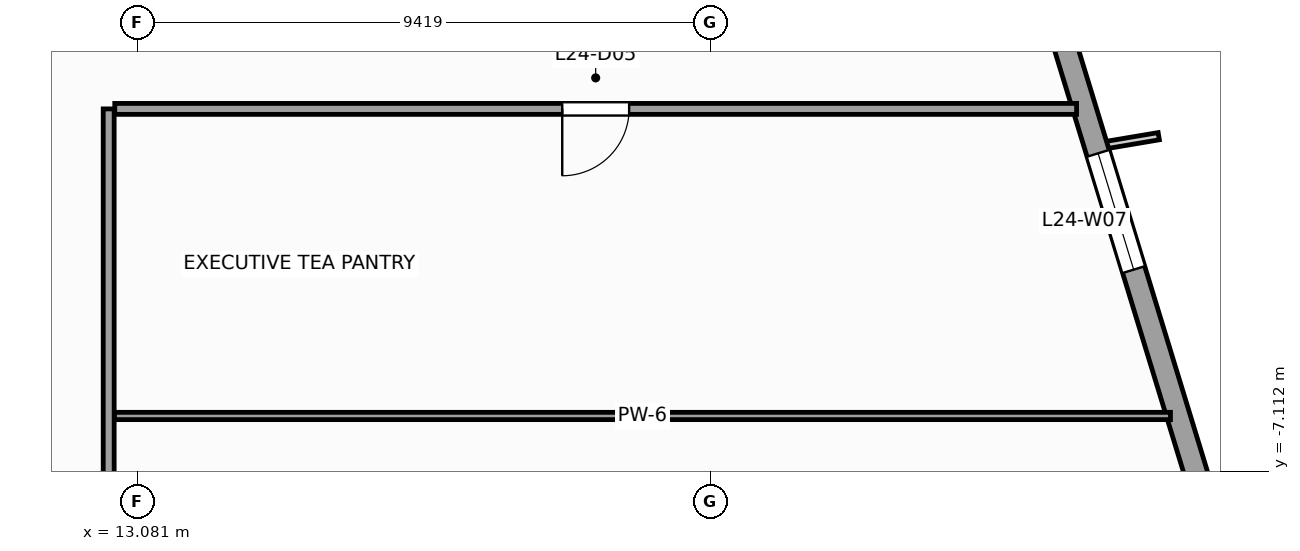
"""IFC4 building model, lengths in metres.
Left out: names, types, materials, properties, quantities, classifications, styles, units other than length and angle.
Written with IfcOpenShell. Run it as: python <this file> out.ifc"""

import sys

from ifc_helpers import new_model, si_unit, direction, frame, frame_2d, origin, place, context, subcontext, project, spatial, rectangle, extrude, source, transform, mapped, element, fill, save


model = new_model("IFC4")
c1 = context("Model", 3, precision=1e-05, world=origin(), true_north=direction((0.0, 1.0)))
c2 = subcontext(c1, "Body", "Model", "MODEL_VIEW")
j1 = project(units=[si_unit("LENGTHUNIT", "METRE"), si_unit("PLANEANGLEUNIT", "RADIAN")], contexts=[c1])
p1 = place(None, origin())
s1 = spatial("IfcSite", under=j1, at=p1, CompositionType="ELEMENT")
p2 = place(p1, origin())
s2 = spatial("IfcBuilding", under=s1, at=p2, CompositionType="ELEMENT")
p3 = place(p2, frame((0.0, 0.0, 103.2)))
s3 = spatial("IfcBuildingStorey", under=s2, at=p3, CompositionType="ELEMENT", Elevation=103.2)
p4 = place(p3, frame((32.658, -14.265, 0.0), z_axis=(0.0, 0.0, 1.0), x_axis=(-0.292373127906, 0.956304320851, 0.0)))
e1 = element("IfcWall", 1, at=p4, inside=s3, PredefinedType="STANDARD", context=c2, shape_type="SweptSolid", body=[
    extrude(rectangle(XDim=46.38, YDim=0.38, at=frame_2d((23.19, 0.0))), origin(), (0.0, 0.0, 1.0), 3.14),
])
p5 = place(p4, frame((4.865, 0.0, 0.51)))
e2 = element("IfcOpeningElement", 2, at=p5, cuts=e1, PredefinedType="OPENING", context=c2, shape_type="SweptSolid", body=[
    extrude(rectangle(XDim=1.4, YDim=2.4, at=frame_2d((0.7, 1.2))), frame((0.0, 0.2, 0.0), z_axis=(0.0, -1.0, 0.0), x_axis=(1.0, 0.0, 0.0)), (0.0, 0.0, 1.0), 0.4),
])
p6 = place(p4, frame((10.95, 0.0, 0.51)))
e3 = element("IfcOpeningElement", 3, at=p6, cuts=e1, PredefinedType="OPENING", context=c2, shape_type="SweptSolid", body=[
    extrude(rectangle(XDim=2.0, YDim=2.4, at=frame_2d((1.0, 1.2))), frame((0.0, 0.2, 0.0), z_axis=(0.0, -1.0, 0.0), x_axis=(1.0, 0.0, 0.0)), (0.0, 0.0, 1.0), 0.4),
])
p7 = place(p4, frame((20.512, 0.0, 0.51)))
e4 = element("IfcOpeningElement", 4, at=p7, cuts=e1, PredefinedType="OPENING", context=c2, shape_type="SweptSolid", body=[
    extrude(rectangle(XDim=2.0, YDim=2.4, at=frame_2d((1.0, 1.2))), frame((0.0, 0.2, 0.0), z_axis=(0.0, -1.0, 0.0), x_axis=(1.0, 0.0, 0.0)), (0.0, 0.0, 1.0), 0.4),
])
p8 = place(p4, frame((30.538, 0.0, 0.51)))
e5 = element("IfcOpeningElement", 5, at=p8, cuts=e1, PredefinedType="OPENING", context=c2, shape_type="SweptSolid", body=[
    extrude(rectangle(XDim=2.0, YDim=2.4, at=frame_2d((1.0, 1.2))), frame((0.0, 0.2, 0.0), z_axis=(0.0, -1.0, 0.0), x_axis=(1.0, 0.0, 0.0)), (0.0, 0.0, 1.0), 0.4),
])
p9 = place(p4, frame((39.187, 0.0, 0.51)))
e6 = element("IfcOpeningElement", 6, at=p9, cuts=e1, PredefinedType="OPENING", context=c2, shape_type="SweptSolid", body=[
    extrude(rectangle(XDim=1.4, YDim=2.4, at=frame_2d((0.7, 1.2))), frame((0.0, 0.2, 0.0), z_axis=(0.0, -1.0, 0.0), x_axis=(1.0, 0.0, 0.0)), (0.0, 0.0, 1.0), 0.4),
])
p10 = place(p3, frame((12.6, -10.45, 0.0), z_axis=(0.0, 0.0, 1.0), x_axis=(0.0, 1.0, 0.0)))
e7 = element("IfcWall", 7, at=p10, inside=s3, PredefinedType="PARTITIONING", context=c2, shape_type="SweptSolid", body=[
    extrude(rectangle(XDim=9.3, YDim=0.18, at=frame_2d((4.65, 0.0))), origin(), (0.0, 0.0, 1.0), 3.74),
])
p11 = place(p3, frame((12.7, -1.15, 0.0), z_axis=(0.0, 0.0, 1.0), x_axis=(1.0, 0.0, 0.0)))
e8 = element("IfcWall", 8, at=p11, inside=s3, PredefinedType="PARTITIONING", context=c2, shape_type="SweptSolid", body=[
    extrude(rectangle(XDim=15.817, YDim=0.18, at=frame_2d((7.909, 0.0))), origin(), (0.0, 0.0, 1.0), 3.74),
])
p12 = place(p11, frame((7.359, 0.0, 0.0)))
e9 = element("IfcOpeningElement", 9, at=p12, cuts=e8, PredefinedType="OPENING", context=c2, shape_type="SweptSolid", body=[
    extrude(rectangle(XDim=1.1, YDim=2.2, at=frame_2d((0.55, 1.1))), frame((0.0, 0.1, 0.0), z_axis=(0.0, -1.0, 0.0), x_axis=(1.0, 0.0, 0.0)), (0.0, 0.0, 1.0), 0.2),
])
p13 = place(p3, frame((12.695, -6.2, 0.0), z_axis=(0.0, 0.0, 1.0), x_axis=(1.0, 0.0, 0.0)))
e10 = element("IfcWall", 10, at=p13, inside=s3, PredefinedType="PARTITIONING", context=c2, shape_type="SweptSolid", body=[
    extrude(rectangle(XDim=17.366, YDim=0.12, at=frame_2d((8.683, 0.0))), origin(), (0.0, 0.0, 1.0), 3.74),
])
m1 = source(origin(), c2, "Body", "SweptSolid", [
    extrude(rectangle(XDim=2.0, YDim=2.4, at=frame_2d((1.0, 1.2))), frame((0.0, 0.03, 0.0), z_axis=(0.0, -1.0, 0.0), x_axis=(1.0, 0.0, 0.0)), (0.0, 0.0, 1.0), 0.06),
])
p14 = place(p6, origin())
e11 = element("IfcWindow", 11, at=p14, inside=s3, PartitioningType="SINGLE_PANEL", PredefinedType="WINDOW", context=c2, shape_type="MappedRepresentation", body=[
    mapped(m1, transform((0.0, 0.0, 0.0), scale=1.0)),
])
fill(e3, e11)
m2 = source(origin(), c2, "Body", "SweptSolid", [
    extrude(rectangle(XDim=1.1, YDim=2.2, at=frame_2d((0.55, 1.1))), frame((0.0, 0.025, 0.0), z_axis=(0.0, -1.0, 0.0), x_axis=(1.0, 0.0, 0.0)), (0.0, 0.0, 1.0), 0.05),
])
p15 = place(p12, frame((1.1, 0.0, 0.0), z_axis=(0.0, 0.0, 1.0), x_axis=(-1.0, 0.0, 0.0)))
e12 = element("IfcDoor", 12, at=p15, inside=s3, OperationType="SINGLE_SWING_LEFT", PredefinedType="DOOR", context=c2, shape_type="MappedRepresentation", body=[
    mapped(m2, transform((0.0, 0.0, 0.0), scale=1.0)),
])
fill(e9, e12)
save(model, sys.argv[1])
